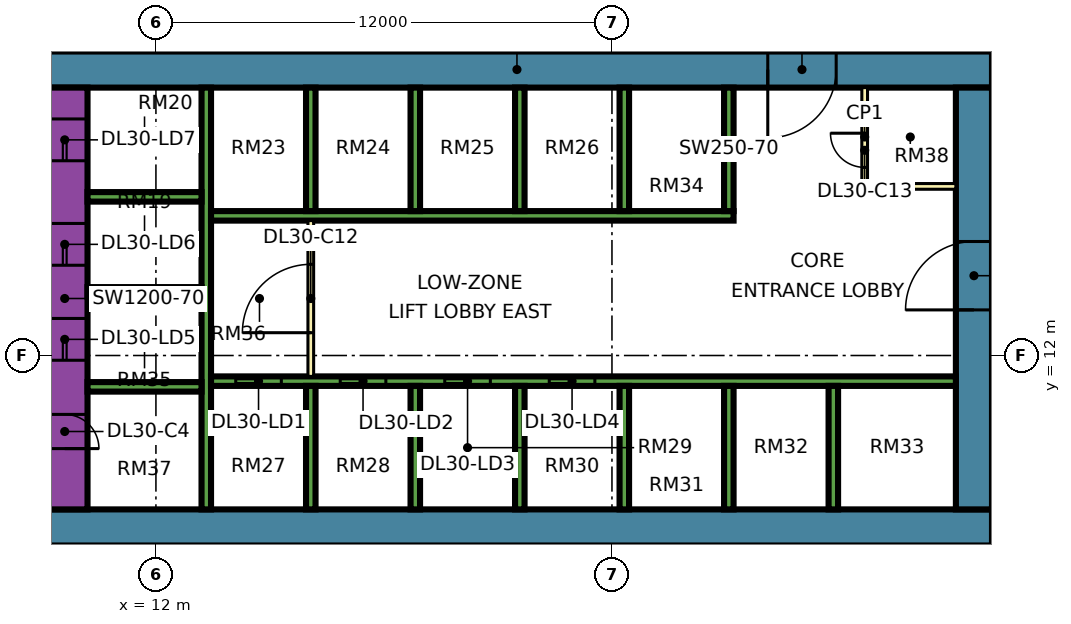
"""IFC4 building model, lengths in metres.
Left out: names, types, materials, properties, quantities, classifications, styles, units other than length and angle.
Written with IfcOpenShell. Run it as: python <this file> out.ifc"""

import sys

from ifc_helpers import new_model, si_unit, direction, frame, frame_2d, origin, place, context, subcontext, project, spatial, rectangle, extrude, element, fill, save


model = new_model("IFC4")
c1 = context("Model", 3, precision=1e-05, world=origin(), true_north=direction((0.0, 1.0)))
c2 = subcontext(c1, "Body", "Model", "MODEL_VIEW")
j1 = project(units=[si_unit("LENGTHUNIT", "METRE"), si_unit("PLANEANGLEUNIT", "RADIAN")], contexts=[c1])
p1 = place(None, origin())
s1 = spatial("IfcSite", under=j1, at=p1, CompositionType="ELEMENT")
p2 = place(p1, origin())
s2 = spatial("IfcBuilding", under=s1, at=p2, CompositionType="ELEMENT")
p3 = place(p2, frame((0.0, 0.0, 129.4)))
s3 = spatial("IfcBuildingStorey", under=s2, at=p3, CompositionType="ELEMENT", Elevation=129.4)
p4 = place(p3, frame((9.0, 7.475, 0.0), z_axis=(0.0, 0.0, 1.0), x_axis=(1.0, 0.0, 0.0)))
e1 = element("IfcWall", 1, at=p4, inside=s3, PredefinedType="SHEAR", context=c2, shape_type="SweptSolid", body=[
    extrude(rectangle(XDim=25.0, YDim=0.95, at=frame_2d((12.5, 0.0))), origin(), (0.0, 0.0, 1.0), 3.75),
])
p5 = place(p3, frame((9.0, 19.525, 0.0), z_axis=(0.0, 0.0, 1.0), x_axis=(1.0, 0.0, 0.0)))
e2 = element("IfcWall", 2, at=p5, inside=s3, PredefinedType="SHEAR", context=c2, shape_type="SweptSolid", body=[
    extrude(rectangle(XDim=25.0, YDim=0.95, at=frame_2d((12.5, 0.0))), origin(), (0.0, 0.0, 1.0), 3.75),
])
p6 = place(p5, frame((19.1, 0.0, 0.0)))
e3 = element("IfcOpeningElement", 3, at=p6, cuts=e2, PredefinedType="OPENING", context=c2, shape_type="SweptSolid", body=[
    extrude(rectangle(XDim=1.8, YDim=2.4, at=frame_2d((0.9, 1.2))), frame((0.0, 0.485, 0.0), z_axis=(0.0, -1.0, 0.0), x_axis=(1.0, 0.0, 0.0)), (0.0, 0.0, 1.0), 0.97),
])
p7 = place(p3, frame((9.6, 7.95, 0.0), z_axis=(0.0, 0.0, 1.0), x_axis=(0.0, 1.0, 0.0)))
e4 = element("IfcWall", 4, at=p7, inside=s3, PredefinedType="SHEAR", context=c2, shape_type="SweptSolid", body=[
    extrude(rectangle(XDim=11.1, YDim=1.2, at=frame_2d((5.55, 0.0))), origin(), (0.0, 0.0, 1.0), 3.75),
])
p8 = place(p7, frame((3.925, 0.0, 0.0)))
e5 = element("IfcOpeningElement", 5, at=p8, cuts=e4, PredefinedType="OPENING", context=c2, shape_type="SweptSolid", body=[
    extrude(rectangle(XDim=1.1, YDim=2.2, at=frame_2d((0.55, 1.1))), frame((0.0, 0.61, 0.0), z_axis=(0.0, -1.0, 0.0), x_axis=(1.0, 0.0, 0.0)), (0.0, 0.0, 1.0), 1.22),
])
p9 = place(p7, frame((6.425, 0.0, 0.0)))
e6 = element("IfcOpeningElement", 6, at=p9, cuts=e4, PredefinedType="OPENING", context=c2, shape_type="SweptSolid", body=[
    extrude(rectangle(XDim=1.1, YDim=2.2, at=frame_2d((0.55, 1.1))), frame((0.0, 0.61, 0.0), z_axis=(0.0, -1.0, 0.0), x_axis=(1.0, 0.0, 0.0)), (0.0, 0.0, 1.0), 1.22),
])
p10 = place(p7, frame((9.175, 0.0, 0.0)))
e7 = element("IfcOpeningElement", 7, at=p10, cuts=e4, PredefinedType="OPENING", context=c2, shape_type="SweptSolid", body=[
    extrude(rectangle(XDim=1.1, YDim=2.2, at=frame_2d((0.55, 1.1))), frame((0.0, 0.61, 0.0), z_axis=(0.0, -1.0, 0.0), x_axis=(1.0, 0.0, 0.0)), (0.0, 0.0, 1.0), 1.22),
])
p11 = place(p7, frame((1.6, 0.0, 0.0)))
e8 = element("IfcOpeningElement", 8, at=p11, cuts=e4, PredefinedType="OPENING", context=c2, shape_type="SweptSolid", body=[
    extrude(rectangle(XDim=0.9, YDim=2.1, at=frame_2d((0.45, 1.05))), frame((0.0, 0.61, 0.0), z_axis=(0.0, -1.0, 0.0), x_axis=(1.0, 0.0, 0.0)), (0.0, 0.0, 1.0), 1.22),
])
p12 = place(p3, frame((33.525, 7.95, 0.0), z_axis=(0.0, 0.0, 1.0), x_axis=(0.0, 1.0, 0.0)))
e9 = element("IfcWall", 9, at=p12, inside=s3, PredefinedType="SHEAR", context=c2, shape_type="SweptSolid", body=[
    extrude(rectangle(XDim=11.1, YDim=0.95, at=frame_2d((5.55, 0.0))), origin(), (0.0, 0.0, 1.0), 3.75),
])
p13 = place(p12, frame((5.25, 0.0, 0.0)))
e10 = element("IfcOpeningElement", 10, at=p13, cuts=e9, PredefinedType="OPENING", context=c2, shape_type="SweptSolid", body=[
    extrude(rectangle(XDim=1.8, YDim=2.4, at=frame_2d((0.9, 1.2))), frame((0.0, 0.485, 0.0), z_axis=(0.0, -1.0, 0.0), x_axis=(1.0, 0.0, 0.0)), (0.0, 0.0, 1.0), 0.97),
])
p14 = place(p3, frame((13.325, 7.95, 0.0), z_axis=(0.0, 0.0, 1.0), x_axis=(0.0, 1.0, 0.0)))
e11 = element("IfcWall", 11, at=p14, inside=s3, PredefinedType="SHEAR", context=c2, shape_type="SweptSolid", body=[
    extrude(rectangle(XDim=11.1, YDim=0.25, at=frame_2d((5.55, 0.0))), origin(), (0.0, 0.0, 1.0), 3.75),
])
p15 = place(p3, frame((13.45, 11.325, 0.0), z_axis=(0.0, 0.0, 1.0), x_axis=(1.0, 0.0, 0.0)))
e12 = element("IfcWall", 12, at=p15, inside=s3, PredefinedType="SHEAR", context=c2, shape_type="SweptSolid", body=[
    extrude(rectangle(XDim=19.6, YDim=0.25, at=frame_2d((9.8, 0.0))), origin(), (0.0, 0.0, 1.0), 3.75),
])
p16 = place(p15, frame((0.65, 0.0, 0.0)))
e13 = element("IfcOpeningElement", 13, at=p16, cuts=e12, PredefinedType="OPENING", context=c2, shape_type="SweptSolid", body=[
    extrude(rectangle(XDim=1.2, YDim=2.2, at=frame_2d((0.6, 1.1))), frame((0.0, 0.135, 0.0), z_axis=(0.0, -1.0, 0.0), x_axis=(1.0, 0.0, 0.0)), (0.0, 0.0, 1.0), 0.27),
])
p17 = place(p15, frame((3.4, 0.0, 0.0)))
e14 = element("IfcOpeningElement", 14, at=p17, cuts=e12, PredefinedType="OPENING", context=c2, shape_type="SweptSolid", body=[
    extrude(rectangle(XDim=1.2, YDim=2.2, at=frame_2d((0.6, 1.1))), frame((0.0, 0.135, 0.0), z_axis=(0.0, -1.0, 0.0), x_axis=(1.0, 0.0, 0.0)), (0.0, 0.0, 1.0), 0.27),
])
p18 = place(p15, frame((6.15, 0.0, 0.0)))
e15 = element("IfcOpeningElement", 15, at=p18, cuts=e12, PredefinedType="OPENING", context=c2, shape_type="SweptSolid", body=[
    extrude(rectangle(XDim=1.2, YDim=2.2, at=frame_2d((0.6, 1.1))), frame((0.0, 0.135, 0.0), z_axis=(0.0, -1.0, 0.0), x_axis=(1.0, 0.0, 0.0)), (0.0, 0.0, 1.0), 0.27),
])
p19 = place(p15, frame((8.9, 0.0, 0.0)))
e16 = element("IfcOpeningElement", 16, at=p19, cuts=e12, PredefinedType="OPENING", context=c2, shape_type="SweptSolid", body=[
    extrude(rectangle(XDim=1.2, YDim=2.2, at=frame_2d((0.6, 1.1))), frame((0.0, 0.135, 0.0), z_axis=(0.0, -1.0, 0.0), x_axis=(1.0, 0.0, 0.0)), (0.0, 0.0, 1.0), 0.27),
])
p20 = place(p3, frame((13.45, 15.675, 0.0), z_axis=(0.0, 0.0, 1.0), x_axis=(1.0, 0.0, 0.0)))
e17 = element("IfcWall", 17, at=p20, inside=s3, PredefinedType="SHEAR", context=c2, shape_type="SweptSolid", body=[
    extrude(rectangle(XDim=13.75, YDim=0.25, at=frame_2d((6.875, 0.0))), origin(), (0.0, 0.0, 1.0), 3.75),
])
for number, where, z_axis, x_axis in (
    (18, (10.2, 11.175, 0.0), (0.0, 0.0, 1.0), (1.0, 0.0, 0.0)),
    (19, (10.2, 13.675, 0.0), (0.0, 0.0, 1.0), (1.0, 0.0, 0.0)),
    (20, (10.2, 16.175, 0.0), (0.0, 0.0, 1.0), (1.0, 0.0, 0.0)),
):
    element("IfcWall", number, at=place(p3, frame(where, z_axis=z_axis, x_axis=x_axis)), inside=s3, PredefinedType="SHEAR", context=c2, shape_type="SweptSolid", body=[
        extrude(rectangle(XDim=3.0, YDim=0.25, at=frame_2d((1.5, 0.0))), origin(), (0.0, 0.0, 1.0), 3.75),
    ])
for number, where, z_axis, x_axis in (
    (21, (16.075, 7.95, 0.0), (0.0, 0.0, 1.0), (0.0, 1.0, 0.0)),
    (22, (18.825, 7.95, 0.0), (0.0, 0.0, 1.0), (0.0, 1.0, 0.0)),
    (23, (21.575, 7.95, 0.0), (0.0, 0.0, 1.0), (0.0, 1.0, 0.0)),
    (24, (24.325, 7.95, 0.0), (0.0, 0.0, 1.0), (0.0, 1.0, 0.0)),
    (25, (27.075, 7.95, 0.0), (0.0, 0.0, 1.0), (0.0, 1.0, 0.0)),
    (26, (29.825, 7.95, 0.0), (0.0, 0.0, 1.0), (0.0, 1.0, 0.0)),
    (27, (16.075, 15.8, 0.0), (0.0, 0.0, 1.0), (0.0, 1.0, 0.0)),
    (28, (18.825, 15.8, 0.0), (0.0, 0.0, 1.0), (0.0, 1.0, 0.0)),
    (29, (21.575, 15.8, 0.0), (0.0, 0.0, 1.0), (0.0, 1.0, 0.0)),
    (30, (24.325, 15.8, 0.0), (0.0, 0.0, 1.0), (0.0, 1.0, 0.0)),
    (31, (27.075, 15.8, 0.0), (0.0, 0.0, 1.0), (0.0, 1.0, 0.0)),
):
    element("IfcWall", number, at=place(p3, frame(where, z_axis=z_axis, x_axis=x_axis)), inside=s3, PredefinedType="SHEAR", context=c2, shape_type="SweptSolid", body=[
        extrude(rectangle(XDim=3.25, YDim=0.25, at=frame_2d((1.625, 0.0))), origin(), (0.0, 0.0, 1.0), 3.75),
    ])
p21 = place(p3, frame((-1.447, 12.553, 0.0), z_axis=(0.0, 0.0, 1.0), x_axis=(0.707106781187, -0.707106781187, 0.0)))
e32 = element("IfcWall", 32, at=p21, inside=s3, PredefinedType="SOLIDWALL", context=c2, shape_type="SweptSolid", body=[
    extrude(rectangle(XDim=19.799, YDim=0.15, at=frame_2d((9.899, 0.0))), origin(), (0.0, 0.0, 1.0), 3.35),
])
p22 = place(p21, frame((2.212, 0.0, 0.45)))
e33 = element("IfcOpeningElement", 33, at=p22, cuts=e32, PredefinedType="OPENING", context=c2, shape_type="SweptSolid", body=[
    extrude(rectangle(XDim=3.0, YDim=2.4, at=frame_2d((1.5, 1.2))), frame((0.0, 0.085, 0.0), z_axis=(0.0, -1.0, 0.0), x_axis=(1.0, 0.0, 0.0)), (0.0, 0.0, 1.0), 0.17),
])
p23 = place(p21, frame((10.216, 0.0, 0.45)))
e34 = element("IfcOpeningElement", 34, at=p23, cuts=e32, PredefinedType="OPENING", context=c2, shape_type="SweptSolid", body=[
    extrude(rectangle(XDim=3.0, YDim=2.4, at=frame_2d((1.5, 1.2))), frame((0.0, 0.085, 0.0), z_axis=(0.0, -1.0, 0.0), x_axis=(1.0, 0.0, 0.0)), (0.0, 0.0, 1.0), 0.17),
])
p24 = place(p3, frame((16.075, 11.45, 0.0), z_axis=(0.0, 0.0, 1.0), x_axis=(0.0, 1.0, 0.0)))
e35 = element("IfcWall", 35, at=p24, inside=s3, PredefinedType="PARTITIONING", context=c2, shape_type="SweptSolid", body=[
    extrude(rectangle(XDim=4.1, YDim=0.15, at=frame_2d((2.05, 0.0))), origin(), (0.0, 0.0, 1.0), 3.35),
])
p25 = place(p24, frame((1.15, 0.0, 0.0)))
e36 = element("IfcOpeningElement", 36, at=p25, cuts=e35, PredefinedType="OPENING", context=c2, shape_type="SweptSolid", body=[
    extrude(rectangle(XDim=1.8, YDim=2.4, at=frame_2d((0.9, 1.2))), frame((0.0, 0.085, 0.0), z_axis=(0.0, -1.0, 0.0), x_axis=(1.0, 0.0, 0.0)), (0.0, 0.0, 1.0), 0.17),
])
p26 = place(p3, frame((30.65, 16.45, 0.0), z_axis=(0.0, 0.0, 1.0), x_axis=(0.0, 1.0, 0.0)))
e37 = element("IfcWall", 37, at=p26, inside=s3, PredefinedType="PARTITIONING", context=c2, shape_type="SweptSolid", body=[
    extrude(rectangle(XDim=2.6, YDim=0.15, at=frame_2d((1.3, 0.0))), origin(), (0.0, 0.0, 1.0), 3.35),
])
p27 = place(p26, frame((0.5, 0.0, 0.0)))
e38 = element("IfcOpeningElement", 38, at=p27, cuts=e37, PredefinedType="OPENING", context=c2, shape_type="SweptSolid", body=[
    extrude(rectangle(XDim=0.9, YDim=2.1, at=frame_2d((0.45, 1.05))), frame((0.0, 0.085, 0.0), z_axis=(0.0, -1.0, 0.0), x_axis=(1.0, 0.0, 0.0)), (0.0, 0.0, 1.0), 0.17),
])
p28 = place(p3, frame((30.65, 16.45, 0.0), z_axis=(0.0, 0.0, 1.0), x_axis=(1.0, 0.0, 0.0)))
e39 = element("IfcWall", 39, at=p28, inside=s3, PredefinedType="PARTITIONING", context=c2, shape_type="SweptSolid", body=[
    extrude(rectangle(XDim=2.4, YDim=0.15, at=frame_2d((1.2, 0.0))), origin(), (0.0, 0.0, 1.0), 3.35),
])
p29 = place(p16, origin())
e40 = element("IfcDoor", 40, at=p29, inside=s3, OperationType="DOUBLE_DOOR_SLIDING", PredefinedType="DOOR", context=c2, shape_type="SweptSolid", body=[
    extrude(rectangle(XDim=1.2, YDim=2.2, at=frame_2d((0.6, 1.1))), frame((0.0, 0.025, 0.0), z_axis=(0.0, -1.0, 0.0), x_axis=(1.0, 0.0, 0.0)), (0.0, 0.0, 1.0), 0.05),
])
fill(e13, e40)
p30 = place(p17, origin())
e41 = element("IfcDoor", 41, at=p30, inside=s3, OperationType="DOUBLE_DOOR_SLIDING", PredefinedType="DOOR", context=c2, shape_type="SweptSolid", body=[
    extrude(rectangle(XDim=1.2, YDim=2.2, at=frame_2d((0.6, 1.1))), frame((0.0, 0.025, 0.0), z_axis=(0.0, -1.0, 0.0), x_axis=(1.0, 0.0, 0.0)), (0.0, 0.0, 1.0), 0.05),
])
fill(e14, e41)
p31 = place(p18, origin())
e42 = element("IfcDoor", 42, at=p31, inside=s3, OperationType="DOUBLE_DOOR_SLIDING", PredefinedType="DOOR", context=c2, shape_type="SweptSolid", body=[
    extrude(rectangle(XDim=1.2, YDim=2.2, at=frame_2d((0.6, 1.1))), frame((0.0, 0.025, 0.0), z_axis=(0.0, -1.0, 0.0), x_axis=(1.0, 0.0, 0.0)), (0.0, 0.0, 1.0), 0.05),
])
fill(e15, e42)
p32 = place(p19, origin())
e43 = element("IfcDoor", 43, at=p32, inside=s3, OperationType="DOUBLE_DOOR_SLIDING", PredefinedType="DOOR", context=c2, shape_type="SweptSolid", body=[
    extrude(rectangle(XDim=1.2, YDim=2.2, at=frame_2d((0.6, 1.1))), frame((0.0, 0.025, 0.0), z_axis=(0.0, -1.0, 0.0), x_axis=(1.0, 0.0, 0.0)), (0.0, 0.0, 1.0), 0.05),
])
fill(e16, e43)
p33 = place(p8, origin())
e44 = element("IfcDoor", 44, at=p33, inside=s3, OperationType="DOUBLE_DOOR_SLIDING", PredefinedType="DOOR", context=c2, shape_type="SweptSolid", body=[
    extrude(rectangle(XDim=1.1, YDim=2.2, at=frame_2d((0.55, 1.1))), frame((0.0, 0.025, 0.0), z_axis=(0.0, -1.0, 0.0), x_axis=(1.0, 0.0, 0.0)), (0.0, 0.0, 1.0), 0.05),
])
fill(e5, e44)
p34 = place(p9, origin())
e45 = element("IfcDoor", 45, at=p34, inside=s3, OperationType="DOUBLE_DOOR_SLIDING", PredefinedType="DOOR", context=c2, shape_type="SweptSolid", body=[
    extrude(rectangle(XDim=1.1, YDim=2.2, at=frame_2d((0.55, 1.1))), frame((0.0, 0.025, 0.0), z_axis=(0.0, -1.0, 0.0), x_axis=(1.0, 0.0, 0.0)), (0.0, 0.0, 1.0), 0.05),
])
fill(e6, e45)
p35 = place(p10, origin())
e46 = element("IfcDoor", 46, at=p35, inside=s3, OperationType="DOUBLE_DOOR_SLIDING", PredefinedType="DOOR", context=c2, shape_type="SweptSolid", body=[
    extrude(rectangle(XDim=1.1, YDim=2.2, at=frame_2d((0.55, 1.1))), frame((0.0, 0.025, 0.0), z_axis=(0.0, -1.0, 0.0), x_axis=(1.0, 0.0, 0.0)), (0.0, 0.0, 1.0), 0.05),
])
fill(e7, e46)
p36 = place(p13, origin())
e47 = element("IfcDoor", 47, at=p36, inside=s3, OperationType="DOUBLE_DOOR_SINGLE_SWING", PredefinedType="DOOR", context=c2, shape_type="SweptSolid", body=[
    extrude(rectangle(XDim=1.8, YDim=2.4, at=frame_2d((0.9, 1.2))), frame((0.0, 0.025, 0.0), z_axis=(0.0, -1.0, 0.0), x_axis=(1.0, 0.0, 0.0)), (0.0, 0.0, 1.0), 0.05),
])
fill(e10, e47)
p37 = place(p6, frame((1.8, 0.0, 0.0), z_axis=(0.0, 0.0, 1.0), x_axis=(-1.0, 0.0, 0.0)))
e48 = element("IfcDoor", 48, at=p37, inside=s3, OperationType="DOUBLE_DOOR_SINGLE_SWING", PredefinedType="DOOR", context=c2, shape_type="SweptSolid", body=[
    extrude(rectangle(XDim=1.8, YDim=2.4, at=frame_2d((0.9, 1.2))), frame((0.0, 0.025, 0.0), z_axis=(0.0, -1.0, 0.0), x_axis=(1.0, 0.0, 0.0)), (0.0, 0.0, 1.0), 0.05),
])
fill(e3, e48)
p38 = place(p11, frame((0.9, 0.0, 0.0), z_axis=(0.0, 0.0, 1.0), x_axis=(-1.0, 0.0, 0.0)))
e49 = element("IfcDoor", 49, at=p38, inside=s3, OperationType="SINGLE_SWING_LEFT", PredefinedType="DOOR", context=c2, shape_type="SweptSolid", body=[
    extrude(rectangle(XDim=0.9, YDim=2.1, at=frame_2d((0.45, 1.05))), frame((0.0, 0.025, 0.0), z_axis=(0.0, -1.0, 0.0), x_axis=(1.0, 0.0, 0.0)), (0.0, 0.0, 1.0), 0.05),
])
fill(e8, e49)
p39 = place(p25, origin())
e50 = element("IfcDoor", 50, at=p39, inside=s3, OperationType="DOUBLE_DOOR_SINGLE_SWING", PredefinedType="DOOR", context=c2, shape_type="SweptSolid", body=[
    extrude(rectangle(XDim=1.8, YDim=2.4, at=frame_2d((0.9, 1.2))), frame((0.0, 0.025, 0.0), z_axis=(0.0, -1.0, 0.0), x_axis=(1.0, 0.0, 0.0)), (0.0, 0.0, 1.0), 0.05),
])
fill(e36, e50)
p40 = place(p27, frame((0.9, 0.0, 0.0), z_axis=(0.0, 0.0, 1.0), x_axis=(-1.0, 0.0, 0.0)))
e51 = element("IfcDoor", 51, at=p40, inside=s3, OperationType="SINGLE_SWING_RIGHT", PredefinedType="DOOR", context=c2, shape_type="SweptSolid", body=[
    extrude(rectangle(XDim=0.9, YDim=2.1, at=frame_2d((0.45, 1.05))), frame((0.0, 0.025, 0.0), z_axis=(0.0, -1.0, 0.0), x_axis=(1.0, 0.0, 0.0)), (0.0, 0.0, 1.0), 0.05),
])
fill(e38, e51)
save(model, sys.argv[1])
